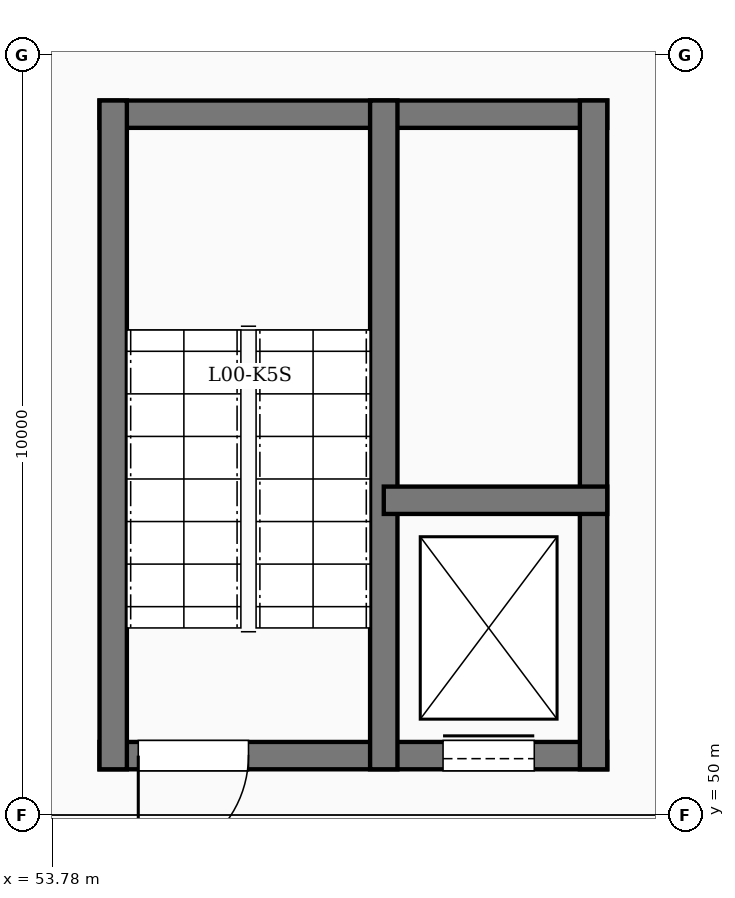
"""IFC4 building model, lengths in metres.
Left out: names, types, materials, properties, quantities, classifications, styles, units other than length and angle.
Written with IfcOpenShell. Run it as: python <this file> out.ifc"""

import sys

from ifc_helpers import new_model, si_unit, direction, frame, frame_2d, origin, place, context, subcontext, project, spatial, rectangle, extrude, element, fill, save


model = new_model("IFC4")
c1 = context("Model", 3, precision=1e-05, world=origin(), true_north=direction((0.0, 1.0)))
c2 = subcontext(c1, "Body", "Model", "MODEL_VIEW")
j1 = project(units=[si_unit("LENGTHUNIT", "METRE"), si_unit("PLANEANGLEUNIT", "RADIAN")], contexts=[c1])
p1 = place(None, origin())
s1 = spatial("IfcSite", under=j1, at=p1, CompositionType="ELEMENT")
p2 = place(p1, origin())
s2 = spatial("IfcBuilding", under=s1, at=p2, CompositionType="ELEMENT")
p3 = place(p2, origin())
s3 = spatial("IfcBuildingStorey", under=s2, at=p3, CompositionType="ELEMENT", Elevation=0.0)
p4 = place(p3, frame((54.4, 50.78, 0.0), z_axis=(0.0, 0.0, 1.0), x_axis=(1.0, 0.0, 0.0)))
e1 = element("IfcWall", 1, at=p4, inside=s3, PredefinedType="SHEAR", context=c2, shape_type="SweptSolid", body=[
    extrude(rectangle(XDim=6.68, YDim=0.36, at=frame_2d((3.34, 0.0))), origin(), (0.0, 0.0, 1.0), 5.4),
])
p5 = place(p4, frame((0.51, 0.0, 0.0)))
e2 = element("IfcOpeningElement", 2, at=p5, cuts=e1, PredefinedType="OPENING", context=c2, shape_type="SweptSolid", body=[
    extrude(rectangle(XDim=1.45, YDim=2.4, at=frame_2d((0.725, 1.2))), frame((0.0, 0.19, 0.0), z_axis=(0.0, -1.0, 0.0), x_axis=(1.0, 0.0, 0.0)), (0.0, 0.0, 1.0), 0.38),
])
p6 = place(p4, frame((4.52, 0.0, 0.0)))
e3 = element("IfcOpeningElement", 3, at=p6, cuts=e1, PredefinedType="OPENING", context=c2, shape_type="SweptSolid", body=[
    extrude(rectangle(XDim=1.2, YDim=2.35, at=frame_2d((0.6, 1.175))), frame((0.0, 0.19, 0.0), z_axis=(0.0, -1.0, 0.0), x_axis=(1.0, 0.0, 0.0)), (0.0, 0.0, 1.0), 0.38),
])
p7 = place(p3, frame((54.4, 59.22, 0.0), z_axis=(0.0, 0.0, 1.0), x_axis=(1.0, 0.0, 0.0)))
e4 = element("IfcWall", 4, at=p7, inside=s3, PredefinedType="SHEAR", context=c2, shape_type="SweptSolid", body=[
    extrude(rectangle(XDim=6.68, YDim=0.36, at=frame_2d((3.34, 0.0))), origin(), (0.0, 0.0, 1.0), 5.4),
])
for number, where, z_axis, x_axis in (
    (5, (54.58, 50.6, 0.0), (0.0, 0.0, 1.0), (0.0, 1.0, 0.0)),
    (6, (60.9, 50.6, 0.0), (0.0, 0.0, 1.0), (0.0, 1.0, 0.0)),
    (7, (58.14, 50.6, 0.0), (0.0, 0.0, 1.0), (0.0, 1.0, 0.0)),
):
    element("IfcWall", number, at=place(p3, frame(where, z_axis=z_axis, x_axis=x_axis)), inside=s3, PredefinedType="SHEAR", context=c2, shape_type="SweptSolid", body=[
        extrude(rectangle(XDim=8.8, YDim=0.36, at=frame_2d((4.4, 0.0))), origin(), (0.0, 0.0, 1.0), 5.4),
    ])
p8 = place(p3, frame((58.14, 54.14, 0.0), z_axis=(0.0, 0.0, 1.0), x_axis=(1.0, 0.0, 0.0)))
e8 = element("IfcWall", 8, at=p8, inside=s3, PredefinedType="SHEAR", context=c2, shape_type="SweptSolid", body=[
    extrude(rectangle(XDim=2.94, YDim=0.36, at=frame_2d((1.47, 0.0))), origin(), (0.0, 0.0, 1.0), 5.4),
])
p9 = place(p5, origin())
e9 = element("IfcDoor", 9, at=p9, inside=s3, OperationType="SINGLE_SWING_LEFT", PredefinedType="DOOR", context=c2, shape_type="SweptSolid", body=[
    extrude(rectangle(XDim=1.45, YDim=2.4, at=frame_2d((0.725, 1.2))), frame((0.0, 0.025, 0.0), z_axis=(0.0, -1.0, 0.0), x_axis=(1.0, 0.0, 0.0)), (0.0, 0.0, 1.0), 0.05),
])
fill(e2, e9)
p10 = place(p6, origin())
e10 = element("IfcDoor", 10, at=p10, inside=s3, OperationType="SLIDING_TO_LEFT", PredefinedType="DOOR", context=c2, shape_type="SweptSolid", body=[
    extrude(rectangle(XDim=1.2, YDim=2.35, at=frame_2d((0.6, 1.175))), frame((0.0, 0.025, 0.0), z_axis=(0.0, -1.0, 0.0), x_axis=(1.0, 0.0, 0.0)), (0.0, 0.0, 1.0), 0.05),
])
fill(e3, e10)
save(model, sys.argv[1])
